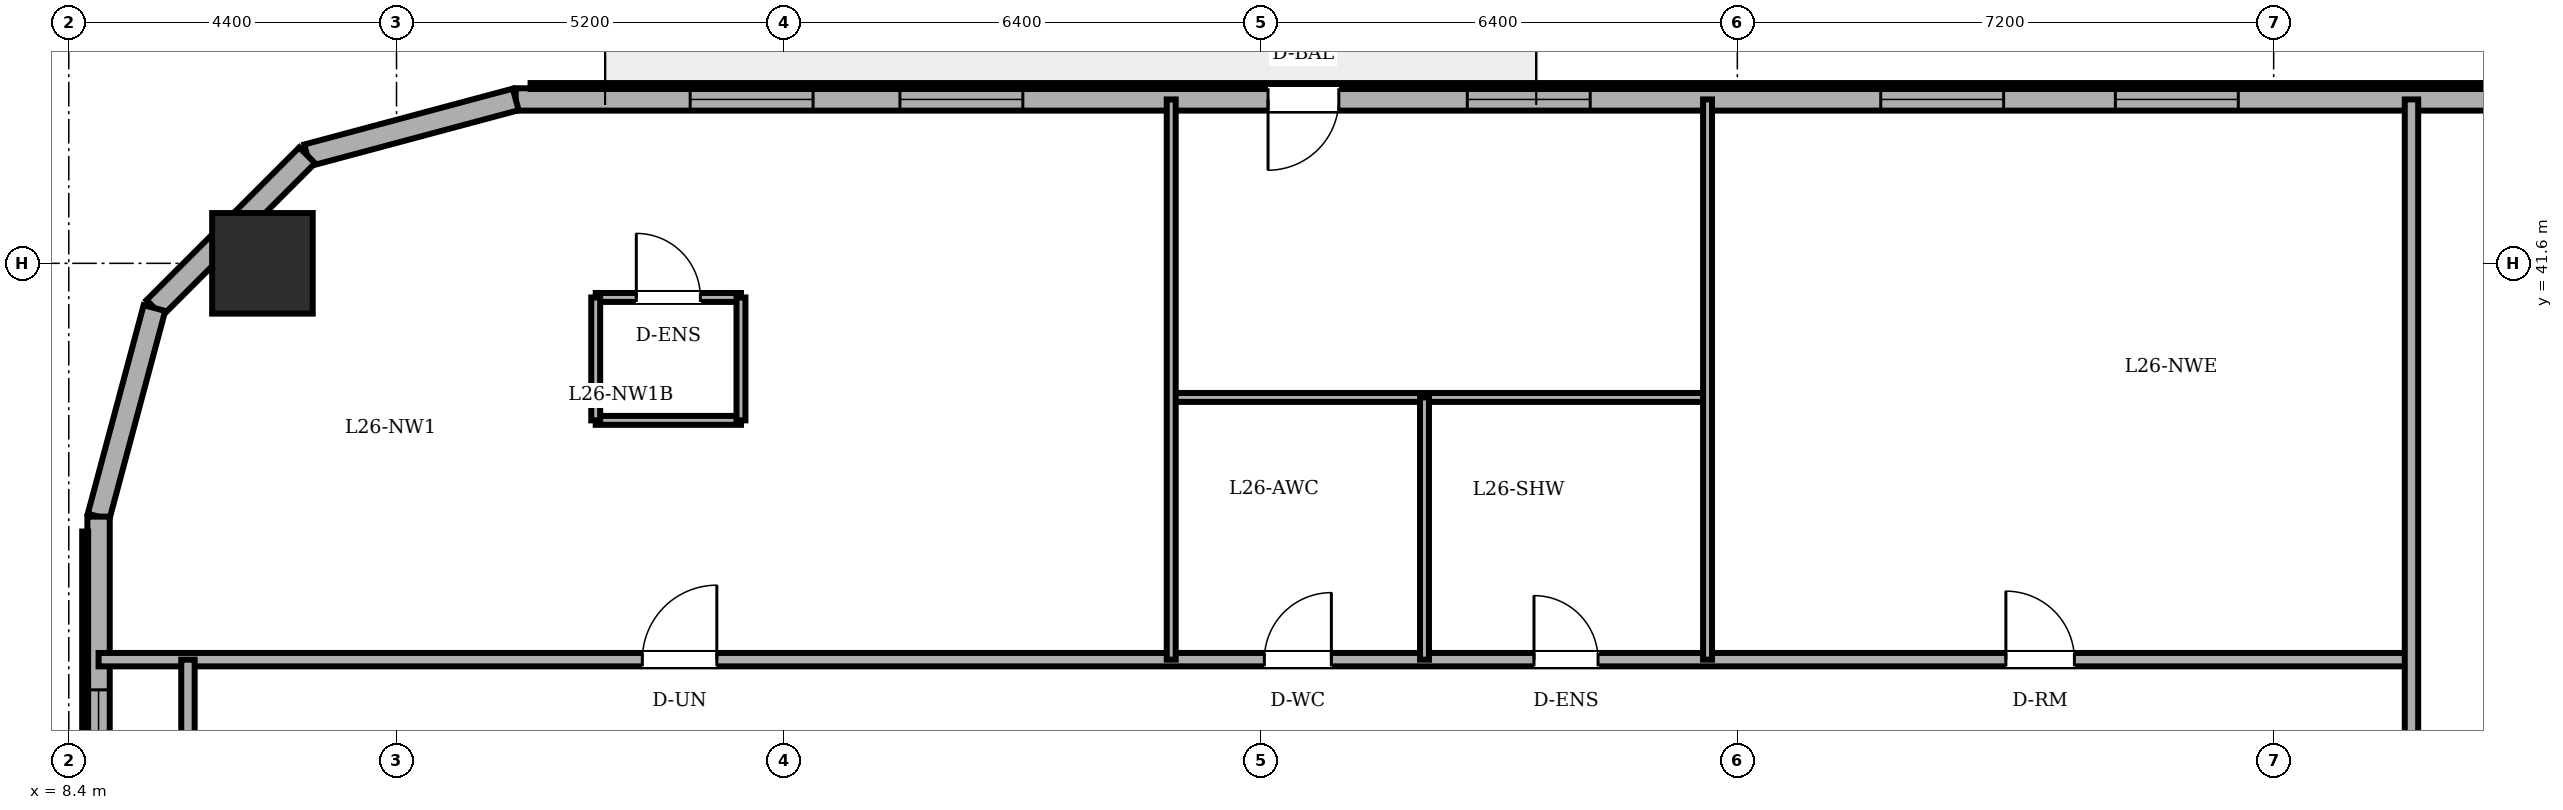
"""IFC4 building model, lengths in metres.
Left out: names, types, materials, properties, quantities, classifications, styles, units other than length and angle.
Written with IfcOpenShell. Run it as: python <this file> out.ifc"""

import sys

from ifc_helpers import new_model, si_unit, direction, frame, frame_2d, origin, origin_2d, place, context, subcontext, project, spatial, rectangle, circle, extrude, element, fill, save


model = new_model("IFC4")
c1 = context("Model", 3, precision=1e-05, world=origin(), true_north=direction((0.0, 1.0)))
c2 = subcontext(c1, "Body", "Model", "MODEL_VIEW")
j1 = project(units=[si_unit("LENGTHUNIT", "METRE"), si_unit("PLANEANGLEUNIT", "RADIAN")], contexts=[c1])
p1 = place(None, origin())
s1 = spatial("IfcSite", under=j1, at=p1, CompositionType="ELEMENT")
p2 = place(p1, origin())
s2 = spatial("IfcBuilding", under=s1, at=p2, CompositionType="ELEMENT")
p3 = place(p2, frame((0.0, 0.0, 100.7)))
s3 = spatial("IfcBuildingStorey", under=s2, at=p3, CompositionType="ELEMENT", Elevation=100.7)
p4 = place(p3, frame((11.0, 41.6, 0.0), z_axis=(0.0, 0.0, 1.0), x_axis=(1.0, 0.0, 0.0)))
e1 = element("IfcColumn", 1, at=p4, inside=s3, PredefinedType="COLUMN", context=c2, shape_type="SweptSolid", body=[
    extrude(circle(Radius=0.675, at=origin_2d()), origin(), (0.0, 0.0, 1.0), 3.6),
])
p5 = place(p3, frame((44.333, 43.8, 0.0), z_axis=(0.0, 0.0, 1.0), x_axis=(-1.0, 0.0, 0.0)))
e2 = element("IfcWall", 2, at=p5, inside=s3, PredefinedType="SOLIDWALL", context=c2, shape_type="SweptSolid", body=[
    extrude(rectangle(XDim=29.933, YDim=0.3, at=frame_2d((14.967, 0.0))), origin(), (0.0, 0.0, 1.0), 3.4),
])
p6 = place(p5, frame((18.883, 0.0, 0.0)))
e3 = element("IfcOpeningElement", 3, at=p6, cuts=e2, PredefinedType="OPENING", context=c2, shape_type="SweptSolid", body=[
    extrude(rectangle(XDim=0.95, YDim=2.2, at=frame_2d((0.475, 1.1))), frame((0.0, 0.16, 0.0), z_axis=(0.0, -1.0, 0.0), x_axis=(1.0, 0.0, 0.0)), (0.0, 0.0, 1.0), 0.32),
])
p7 = place(p5, frame((1.591, 0.0, 0.85)))
e4 = element("IfcOpeningElement", 4, at=p7, cuts=e2, PredefinedType="OPENING", context=c2, shape_type="SweptSolid", body=[
    extrude(rectangle(XDim=1.65, YDim=1.55, at=frame_2d((0.825, 0.775))), frame((0.0, 0.16, 0.0), z_axis=(0.0, -1.0, 0.0), x_axis=(1.0, 0.0, 0.0)), (0.0, 0.0, 1.0), 0.32),
])
p8 = place(p5, frame((6.808, 0.0, 0.85)))
e5 = element("IfcOpeningElement", 5, at=p8, cuts=e2, PredefinedType="OPENING", context=c2, shape_type="SweptSolid", body=[
    extrude(rectangle(XDim=1.65, YDim=1.55, at=frame_2d((0.825, 0.775))), frame((0.0, 0.16, 0.0), z_axis=(0.0, -1.0, 0.0), x_axis=(1.0, 0.0, 0.0)), (0.0, 0.0, 1.0), 0.32),
])
p9 = place(p5, frame((9.958, 0.0, 0.85)))
e6 = element("IfcOpeningElement", 6, at=p9, cuts=e2, PredefinedType="OPENING", context=c2, shape_type="SweptSolid", body=[
    extrude(rectangle(XDim=1.65, YDim=1.55, at=frame_2d((0.825, 0.775))), frame((0.0, 0.16, 0.0), z_axis=(0.0, -1.0, 0.0), x_axis=(1.0, 0.0, 0.0)), (0.0, 0.0, 1.0), 0.32),
])
p10 = place(p5, frame((15.508, 0.0, 0.85)))
e7 = element("IfcOpeningElement", 7, at=p10, cuts=e2, PredefinedType="OPENING", context=c2, shape_type="SweptSolid", body=[
    extrude(rectangle(XDim=1.65, YDim=1.55, at=frame_2d((0.825, 0.775))), frame((0.0, 0.16, 0.0), z_axis=(0.0, -1.0, 0.0), x_axis=(1.0, 0.0, 0.0)), (0.0, 0.0, 1.0), 0.32),
])
p11 = place(p5, frame((23.125, 0.0, 0.85)))
e8 = element("IfcOpeningElement", 8, at=p11, cuts=e2, PredefinedType="OPENING", context=c2, shape_type="SweptSolid", body=[
    extrude(rectangle(XDim=1.65, YDim=1.55, at=frame_2d((0.825, 0.775))), frame((0.0, 0.16, 0.0), z_axis=(0.0, -1.0, 0.0), x_axis=(1.0, 0.0, 0.0)), (0.0, 0.0, 1.0), 0.32),
])
p12 = place(p5, frame((25.941, 0.0, 0.85)))
e9 = element("IfcOpeningElement", 9, at=p12, cuts=e2, PredefinedType="OPENING", context=c2, shape_type="SweptSolid", body=[
    extrude(rectangle(XDim=1.65, YDim=1.55, at=frame_2d((0.825, 0.775))), frame((0.0, 0.16, 0.0), z_axis=(0.0, -1.0, 0.0), x_axis=(1.0, 0.0, 0.0)), (0.0, 0.0, 1.0), 0.32),
])
p13 = place(p3, frame((14.4, 43.8, 0.0), z_axis=(0.0, 0.0, 1.0), x_axis=(-0.965943540406, -0.258752926066, 0.0)))
e10 = element("IfcWall", 10, at=p13, inside=s3, PredefinedType="SOLIDWALL", context=c2, shape_type="SweptSolid", body=[
    extrude(rectangle(XDim=2.898, YDim=0.3, at=frame_2d((1.449, 0.0))), origin(), (0.0, 0.0, 1.0), 3.4),
])
p14 = place(p3, frame((11.6, 43.05, 0.0), z_axis=(0.0, 0.0, 1.0), x_axis=(-0.707106781187, -0.707106781187, 0.0)))
e11 = element("IfcWall", 11, at=p14, inside=s3, PredefinedType="SOLIDWALL", context=c2, shape_type="SweptSolid", body=[
    extrude(rectangle(XDim=2.899, YDim=0.3, at=frame_2d((1.45, 0.0))), origin(), (0.0, 0.0, 1.0), 3.4),
])
p15 = place(p3, frame((9.55, 41.0, 0.0), z_axis=(0.0, 0.0, 1.0), x_axis=(-0.258731875344, -0.96594917914, 0.0)))
e12 = element("IfcWall", 12, at=p15, inside=s3, PredefinedType="SOLIDWALL", context=c2, shape_type="SweptSolid", body=[
    extrude(rectangle(XDim=2.899, YDim=0.3, at=frame_2d((1.449, 0.0))), origin(), (0.0, 0.0, 1.0), 3.4),
])
p16 = place(p3, frame((8.8, 38.2, 0.0), z_axis=(0.0, 0.0, 1.0), x_axis=(0.0, -1.0, 0.0)))
e13 = element("IfcWall", 13, at=p16, inside=s3, PredefinedType="SOLIDWALL", context=c2, shape_type="SweptSolid", body=[
    extrude(rectangle(XDim=28.4, YDim=0.3, at=frame_2d((14.2, 0.0))), origin(), (0.0, 0.0, 1.0), 3.4),
])
p17 = place(p16, frame((2.325, 0.0, 0.85)))
e14 = element("IfcOpeningElement", 14, at=p17, cuts=e13, PredefinedType="OPENING", context=c2, shape_type="SweptSolid", body=[
    extrude(rectangle(XDim=1.65, YDim=1.55, at=frame_2d((0.825, 0.775))), frame((0.0, 0.16, 0.0), z_axis=(0.0, -1.0, 0.0), x_axis=(1.0, 0.0, 0.0)), (0.0, 0.0, 1.0), 0.32),
])
p18 = place(p16, frame((7.328, 0.0, 0.85)))
e15 = element("IfcOpeningElement", 15, at=p18, cuts=e13, PredefinedType="OPENING", context=c2, shape_type="SweptSolid", body=[
    extrude(rectangle(XDim=1.65, YDim=1.55, at=frame_2d((0.825, 0.775))), frame((0.0, 0.16, 0.0), z_axis=(0.0, -1.0, 0.0), x_axis=(1.0, 0.0, 0.0)), (0.0, 0.0, 1.0), 0.32),
])
p19 = place(p16, frame((11.102, 0.0, 0.85)))
e16 = element("IfcOpeningElement", 16, at=p19, cuts=e13, PredefinedType="OPENING", context=c2, shape_type="SweptSolid", body=[
    extrude(rectangle(XDim=1.65, YDim=1.55, at=frame_2d((0.825, 0.775))), frame((0.0, 0.16, 0.0), z_axis=(0.0, -1.0, 0.0), x_axis=(1.0, 0.0, 0.0)), (0.0, 0.0, 1.0), 0.32),
])
p20 = place(p16, frame((17.648, 0.0, 0.85)))
e17 = element("IfcOpeningElement", 17, at=p20, cuts=e13, PredefinedType="OPENING", context=c2, shape_type="SweptSolid", body=[
    extrude(rectangle(XDim=1.65, YDim=1.55, at=frame_2d((0.825, 0.775))), frame((0.0, 0.16, 0.0), z_axis=(0.0, -1.0, 0.0), x_axis=(1.0, 0.0, 0.0)), (0.0, 0.0, 1.0), 0.32),
])
p21 = place(p16, frame((20.422, 0.0, 0.85)))
e18 = element("IfcOpeningElement", 18, at=p21, cuts=e13, PredefinedType="OPENING", context=c2, shape_type="SweptSolid", body=[
    extrude(rectangle(XDim=1.65, YDim=1.55, at=frame_2d((0.825, 0.775))), frame((0.0, 0.16, 0.0), z_axis=(0.0, -1.0, 0.0), x_axis=(1.0, 0.0, 0.0)), (0.0, 0.0, 1.0), 0.32),
])
p22 = place(p16, frame((24.425, 0.0, 0.85)))
e19 = element("IfcOpeningElement", 19, at=p22, cuts=e13, PredefinedType="OPENING", context=c2, shape_type="SweptSolid", body=[
    extrude(rectangle(XDim=1.65, YDim=1.55, at=frame_2d((0.825, 0.775))), frame((0.0, 0.16, 0.0), z_axis=(0.0, -1.0, 0.0), x_axis=(1.0, 0.0, 0.0)), (0.0, 0.0, 1.0), 0.32),
])
p23 = place(p3, frame((15.474, 41.142, 0.0), z_axis=(0.0, 0.0, 1.0), x_axis=(1.0, 0.0, 0.0)))
e20 = element("IfcWall", 20, at=p23, inside=s3, PredefinedType="PARTITIONING", context=c2, shape_type="SweptSolid", body=[
    extrude(rectangle(XDim=1.95, YDim=0.12, at=frame_2d((0.975, 0.0))), origin(), (0.0, 0.0, 1.0), 3.4),
])
p24 = place(p23, frame((0.545, 0.0, 0.0)))
e21 = element("IfcOpeningElement", 21, at=p24, cuts=e20, PredefinedType="OPENING", context=c2, shape_type="SweptSolid", body=[
    extrude(rectangle(XDim=0.86, YDim=2.1, at=frame_2d((0.43, 1.05))), frame((0.0, 0.07, 0.0), z_axis=(0.0, -1.0, 0.0), x_axis=(1.0, 0.0, 0.0)), (0.0, 0.0, 1.0), 0.14),
])
p25 = place(p3, frame((17.424, 39.492, 0.0), z_axis=(0.0, 0.0, 1.0), x_axis=(-1.0, 0.0, 0.0)))
e22 = element("IfcWall", 22, at=p25, inside=s3, PredefinedType="PARTITIONING", context=c2, shape_type="SweptSolid", body=[
    extrude(rectangle(XDim=1.95, YDim=0.12, at=frame_2d((0.975, 0.0))), origin(), (0.0, 0.0, 1.0), 3.4),
])
for number, where, z_axis, x_axis in (
    (23, (15.474, 41.142, 0.0), (0.0, 0.0, 1.0), (0.0, -1.0, 0.0)),
    (24, (17.424, 39.492, 0.0), (0.0, 0.0, 1.0), (0.0, 1.0, 0.0)),
):
    element("IfcWall", number, at=place(p3, frame(where, z_axis=z_axis, x_axis=x_axis)), inside=s3, PredefinedType="PARTITIONING", context=c2, shape_type="SweptSolid", body=[
        extrude(rectangle(XDim=1.65, YDim=0.12, at=frame_2d((0.825, 0.0))), origin(), (0.0, 0.0, 1.0), 3.4),
    ])
p26 = place(p3, frame((8.8, 36.28, 0.0), z_axis=(0.0, 0.0, 1.0), x_axis=(1.0, 0.0, 0.0)))
e25 = element("IfcWall", 25, at=p26, inside=s3, PredefinedType="PARTITIONING", context=c2, shape_type="SweptSolid", body=[
    extrude(rectangle(XDim=31.05, YDim=0.18, at=frame_2d((15.525, 0.0))), origin(), (0.0, 0.0, 1.0), 3.4),
])
p27 = place(p26, frame((15.65, 0.0, 0.0)))
e26 = element("IfcOpeningElement", 26, at=p27, cuts=e25, PredefinedType="OPENING", context=c2, shape_type="SweptSolid", body=[
    extrude(rectangle(XDim=0.9, YDim=2.1, at=frame_2d((0.45, 1.05))), frame((0.0, 0.1, 0.0), z_axis=(0.0, -1.0, 0.0), x_axis=(1.0, 0.0, 0.0)), (0.0, 0.0, 1.0), 0.2),
])
p28 = place(p26, frame((19.27, 0.0, 0.0)))
e27 = element("IfcOpeningElement", 27, at=p28, cuts=e25, PredefinedType="OPENING", context=c2, shape_type="SweptSolid", body=[
    extrude(rectangle(XDim=0.86, YDim=2.1, at=frame_2d((0.43, 1.05))), frame((0.0, 0.1, 0.0), z_axis=(0.0, -1.0, 0.0), x_axis=(1.0, 0.0, 0.0)), (0.0, 0.0, 1.0), 0.2),
])
p29 = place(p26, frame((7.3, 0.0, 0.0)))
e28 = element("IfcOpeningElement", 28, at=p29, cuts=e25, PredefinedType="OPENING", context=c2, shape_type="SweptSolid", body=[
    extrude(rectangle(XDim=1.0, YDim=2.15, at=frame_2d((0.5, 1.075))), frame((0.0, 0.1, 0.0), z_axis=(0.0, -1.0, 0.0), x_axis=(1.0, 0.0, 0.0)), (0.0, 0.0, 1.0), 0.2),
])
p30 = place(p26, frame((25.605, 0.0, 0.0)))
e29 = element("IfcOpeningElement", 29, at=p30, cuts=e25, PredefinedType="OPENING", context=c2, shape_type="SweptSolid", body=[
    extrude(rectangle(XDim=0.92, YDim=2.1, at=frame_2d((0.46, 1.05))), frame((0.0, 0.1, 0.0), z_axis=(0.0, -1.0, 0.0), x_axis=(1.0, 0.0, 0.0)), (0.0, 0.0, 1.0), 0.2),
])
p31 = place(p3, frame((23.2, 39.8, 0.0), z_axis=(0.0, 0.0, 1.0), x_axis=(1.0, 0.0, 0.0)))
e30 = element("IfcWall", 30, at=p31, inside=s3, PredefinedType="PARTITIONING", context=c2, shape_type="SweptSolid", body=[
    extrude(rectangle(XDim=7.2, YDim=0.12, at=frame_2d((3.6, 0.0))), origin(), (0.0, 0.0, 1.0), 3.4),
])
p32 = place(p3, frame((10.0, 33.82, 0.0), z_axis=(0.0, 0.0, 1.0), x_axis=(0.0, 1.0, 0.0)))
e31 = element("IfcWall", 31, at=p32, inside=s3, PredefinedType="PARTITIONING", context=c2, shape_type="SweptSolid", body=[
    extrude(rectangle(XDim=2.46, YDim=0.18, at=frame_2d((1.23, 0.0))), origin(), (0.0, 0.0, 1.0), 3.4),
])
p33 = place(p3, frame((23.2, 36.28, 0.0), z_axis=(0.0, 0.0, 1.0), x_axis=(0.0, 1.0, 0.0)))
e32 = element("IfcWall", 32, at=p33, inside=s3, PredefinedType="PARTITIONING", context=c2, shape_type="SweptSolid", body=[
    extrude(rectangle(XDim=7.52, YDim=0.12, at=frame_2d((3.76, 0.0))), origin(), (0.0, 0.0, 1.0), 3.4),
])
p34 = place(p3, frame((26.6, 36.28, 0.0), z_axis=(0.0, 0.0, 1.0), x_axis=(0.0, 1.0, 0.0)))
e33 = element("IfcWall", 33, at=p34, inside=s3, PredefinedType="PARTITIONING", context=c2, shape_type="SweptSolid", body=[
    extrude(rectangle(XDim=3.52, YDim=0.12, at=frame_2d((1.76, 0.0))), origin(), (0.0, 0.0, 1.0), 3.4),
])
p35 = place(p3, frame((30.4, 36.28, 0.0), z_axis=(0.0, 0.0, 1.0), x_axis=(0.0, 1.0, 0.0)))
e34 = element("IfcWall", 34, at=p35, inside=s3, PredefinedType="PARTITIONING", context=c2, shape_type="SweptSolid", body=[
    extrude(rectangle(XDim=7.52, YDim=0.12, at=frame_2d((3.76, 0.0))), origin(), (0.0, 0.0, 1.0), 3.4),
])
p36 = place(p3, frame((39.85, 25.18, 0.0), z_axis=(0.0, 0.0, 1.0), x_axis=(0.0, 1.0, 0.0)))
e35 = element("IfcWall", 35, at=p36, inside=s3, PredefinedType="PARTITIONING", context=c2, shape_type="SweptSolid", body=[
    extrude(rectangle(XDim=18.62, YDim=0.18, at=frame_2d((9.31, 0.0))), origin(), (0.0, 0.0, 1.0), 3.4),
])
p37 = place(p36, frame((5.35, 0.0, 0.0)))
e36 = element("IfcOpeningElement", 36, at=p37, cuts=e35, PredefinedType="OPENING", context=c2, shape_type="SweptSolid", body=[
    extrude(rectangle(XDim=0.92, YDim=2.1, at=frame_2d((0.46, 1.05))), frame((0.0, 0.1, 0.0), z_axis=(0.0, -1.0, 0.0), x_axis=(1.0, 0.0, 0.0)), (0.0, 0.0, 1.0), 0.2),
])
p38 = place(p6, origin())
e37 = element("IfcDoor", 37, at=p38, inside=s3, OperationType="SINGLE_SWING_RIGHT", PredefinedType="DOOR", context=c2, shape_type="SweptSolid", body=[
    extrude(rectangle(XDim=0.95, YDim=2.2, at=frame_2d((0.475, 1.1))), frame((0.0, 0.025, 0.0), z_axis=(0.0, -1.0, 0.0), x_axis=(1.0, 0.0, 0.0)), (0.0, 0.0, 1.0), 0.05),
])
fill(e3, e37)
p39 = place(p8, origin())
e38 = element("IfcWindow", 38, at=p39, inside=s3, PartitioningType="DOUBLE_PANEL_VERTICAL", PredefinedType="WINDOW", context=c2, shape_type="SweptSolid", body=[
    extrude(rectangle(XDim=1.65, YDim=1.55, at=frame_2d((0.825, 0.775))), frame((0.0, 0.03, 0.0), z_axis=(0.0, -1.0, 0.0), x_axis=(1.0, 0.0, 0.0)), (0.0, 0.0, 1.0), 0.06),
])
fill(e5, e38)
p40 = place(p9, origin())
e39 = element("IfcWindow", 39, at=p40, inside=s3, PartitioningType="DOUBLE_PANEL_VERTICAL", PredefinedType="WINDOW", context=c2, shape_type="SweptSolid", body=[
    extrude(rectangle(XDim=1.65, YDim=1.55, at=frame_2d((0.825, 0.775))), frame((0.0, 0.03, 0.0), z_axis=(0.0, -1.0, 0.0), x_axis=(1.0, 0.0, 0.0)), (0.0, 0.0, 1.0), 0.06),
])
fill(e6, e39)
p41 = place(p10, origin())
e40 = element("IfcWindow", 40, at=p41, inside=s3, PartitioningType="DOUBLE_PANEL_VERTICAL", PredefinedType="WINDOW", context=c2, shape_type="SweptSolid", body=[
    extrude(rectangle(XDim=1.65, YDim=1.55, at=frame_2d((0.825, 0.775))), frame((0.0, 0.03, 0.0), z_axis=(0.0, -1.0, 0.0), x_axis=(1.0, 0.0, 0.0)), (0.0, 0.0, 1.0), 0.06),
])
fill(e7, e40)
p42 = place(p11, origin())
e41 = element("IfcWindow", 41, at=p42, inside=s3, PartitioningType="DOUBLE_PANEL_VERTICAL", PredefinedType="WINDOW", context=c2, shape_type="SweptSolid", body=[
    extrude(rectangle(XDim=1.65, YDim=1.55, at=frame_2d((0.825, 0.775))), frame((0.0, 0.03, 0.0), z_axis=(0.0, -1.0, 0.0), x_axis=(1.0, 0.0, 0.0)), (0.0, 0.0, 1.0), 0.06),
])
fill(e8, e41)
p43 = place(p12, origin())
e42 = element("IfcWindow", 42, at=p43, inside=s3, PartitioningType="DOUBLE_PANEL_VERTICAL", PredefinedType="WINDOW", context=c2, shape_type="SweptSolid", body=[
    extrude(rectangle(XDim=1.65, YDim=1.55, at=frame_2d((0.825, 0.775))), frame((0.0, 0.03, 0.0), z_axis=(0.0, -1.0, 0.0), x_axis=(1.0, 0.0, 0.0)), (0.0, 0.0, 1.0), 0.06),
])
fill(e9, e42)
p44 = place(p17, origin())
e43 = element("IfcWindow", 43, at=p44, inside=s3, PartitioningType="DOUBLE_PANEL_VERTICAL", PredefinedType="WINDOW", context=c2, shape_type="SweptSolid", body=[
    extrude(rectangle(XDim=1.65, YDim=1.55, at=frame_2d((0.825, 0.775))), frame((0.0, 0.03, 0.0), z_axis=(0.0, -1.0, 0.0), x_axis=(1.0, 0.0, 0.0)), (0.0, 0.0, 1.0), 0.06),
])
fill(e14, e43)
p45 = place(p24, origin())
e44 = element("IfcDoor", 44, at=p45, inside=s3, OperationType="SINGLE_SWING_LEFT", PredefinedType="DOOR", context=c2, shape_type="SweptSolid", body=[
    extrude(rectangle(XDim=0.86, YDim=2.1, at=frame_2d((0.43, 1.05))), frame((0.0, 0.025, 0.0), z_axis=(0.0, -1.0, 0.0), x_axis=(1.0, 0.0, 0.0)), (0.0, 0.0, 1.0), 0.05),
])
fill(e21, e44)
p46 = place(p27, origin())
e45 = element("IfcDoor", 45, at=p46, inside=s3, OperationType="SINGLE_SWING_RIGHT", PredefinedType="DOOR", context=c2, shape_type="SweptSolid", body=[
    extrude(rectangle(XDim=0.9, YDim=2.1, at=frame_2d((0.45, 1.05))), frame((0.0, 0.025, 0.0), z_axis=(0.0, -1.0, 0.0), x_axis=(1.0, 0.0, 0.0)), (0.0, 0.0, 1.0), 0.05),
])
fill(e26, e45)
p47 = place(p28, origin())
e46 = element("IfcDoor", 46, at=p47, inside=s3, OperationType="SINGLE_SWING_LEFT", PredefinedType="DOOR", context=c2, shape_type="SweptSolid", body=[
    extrude(rectangle(XDim=0.86, YDim=2.1, at=frame_2d((0.43, 1.05))), frame((0.0, 0.025, 0.0), z_axis=(0.0, -1.0, 0.0), x_axis=(1.0, 0.0, 0.0)), (0.0, 0.0, 1.0), 0.05),
])
fill(e27, e46)
p48 = place(p29, origin())
e47 = element("IfcDoor", 47, at=p48, inside=s3, OperationType="SINGLE_SWING_RIGHT", PredefinedType="DOOR", context=c2, shape_type="SweptSolid", body=[
    extrude(rectangle(XDim=1.0, YDim=2.15, at=frame_2d((0.5, 1.075))), frame((0.0, 0.025, 0.0), z_axis=(0.0, -1.0, 0.0), x_axis=(1.0, 0.0, 0.0)), (0.0, 0.0, 1.0), 0.05),
])
fill(e28, e47)
p49 = place(p30, origin())
e48 = element("IfcDoor", 48, at=p49, inside=s3, OperationType="SINGLE_SWING_LEFT", PredefinedType="DOOR", context=c2, shape_type="SweptSolid", body=[
    extrude(rectangle(XDim=0.92, YDim=2.1, at=frame_2d((0.46, 1.05))), frame((0.0, 0.025, 0.0), z_axis=(0.0, -1.0, 0.0), x_axis=(1.0, 0.0, 0.0)), (0.0, 0.0, 1.0), 0.05),
])
fill(e29, e48)
save(model, sys.argv[1])
